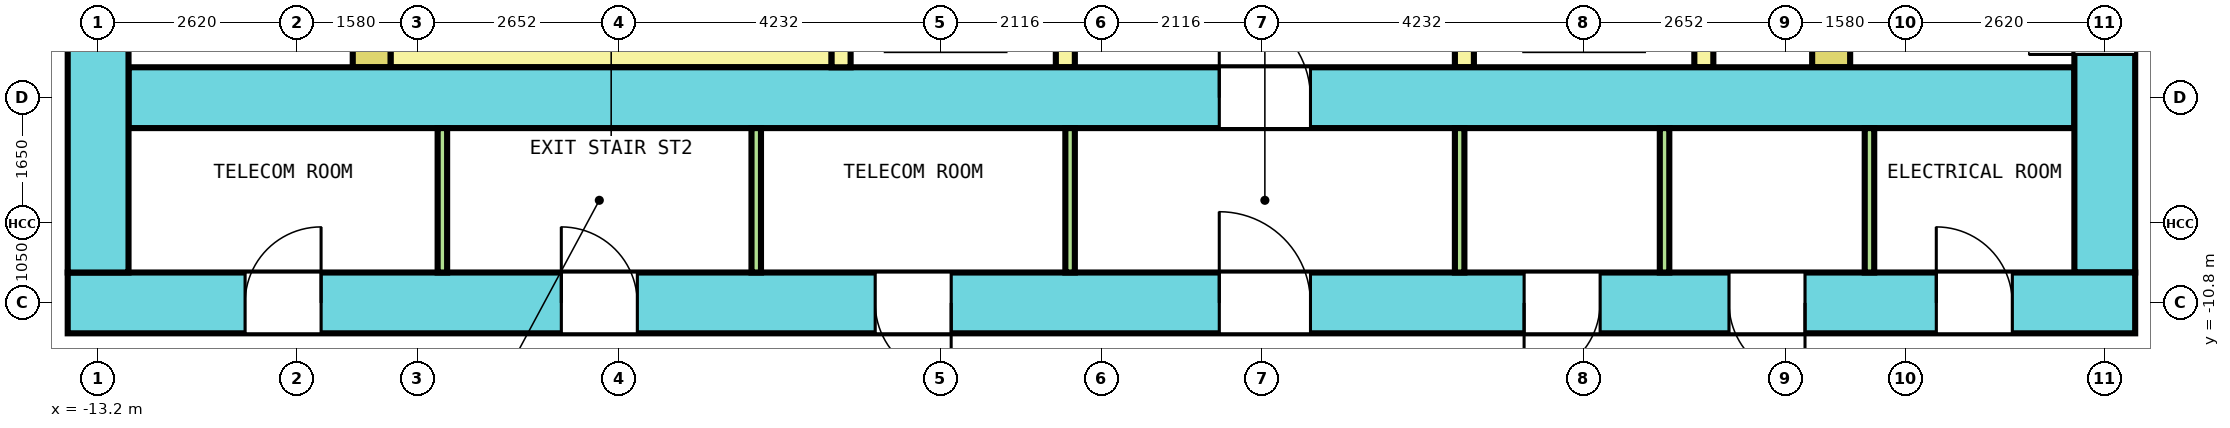
"""IFC4 building model, lengths in metres.
Left out: names, types, materials, properties, quantities, classifications, styles, units other than length and angle.
Written with IfcOpenShell. Run it as: python <this file> out.ifc"""

import sys

from ifc_helpers import new_model, si_unit, direction, frame, frame_2d, origin, place, context, subcontext, project, spatial, rectangle, extrude, element, fill, save


model = new_model("IFC4")
c1 = context("Model", 3, precision=1e-05, world=origin(), true_north=direction((0.0, 1.0)))
c2 = subcontext(c1, "Body", "Model", "MODEL_VIEW")
j1 = project(units=[si_unit("LENGTHUNIT", "METRE"), si_unit("PLANEANGLEUNIT", "RADIAN")], contexts=[c1])
p1 = place(None, origin())
s1 = spatial("IfcSite", under=j1, at=p1, CompositionType="ELEMENT")
p2 = place(p1, origin())
s2 = spatial("IfcBuilding", under=s1, at=p2, CompositionType="ELEMENT")
p3 = place(p2, frame((0.0, 0.0, 80.8)))
s3 = spatial("IfcBuildingStorey", under=s2, at=p3, CompositionType="ELEMENT", Elevation=80.8)
p4 = place(p3, frame((-13.6, -10.8, 0.0), z_axis=(0.0, 0.0, 1.0), x_axis=(1.0, 0.0, 0.0)))
e1 = element("IfcWall", 1, at=p4, inside=s3, PredefinedType="SHEAR", context=c2, shape_type="SweptSolid", body=[
    extrude(rectangle(XDim=27.2, YDim=0.8, at=frame_2d((13.6, 0.0))), origin(), (0.0, 0.0, 1.0), 4.1),
])
p5 = place(p4, frame((2.333, 0.0, 0.0)))
e2 = element("IfcOpeningElement", 2, at=p5, cuts=e1, PredefinedType="OPENING", context=c2, shape_type="SweptSolid", body=[
    extrude(rectangle(XDim=1.0, YDim=2.1, at=frame_2d((0.5, 1.05))), frame((0.0, 0.41, 0.0), z_axis=(0.0, -1.0, 0.0), x_axis=(1.0, 0.0, 0.0)), (0.0, 0.0, 1.0), 0.82),
])
p6 = place(p4, frame((6.494, 0.0, 0.0)))
e3 = element("IfcOpeningElement", 3, at=p6, cuts=e1, PredefinedType="OPENING", context=c2, shape_type="SweptSolid", body=[
    extrude(rectangle(XDim=1.0, YDim=2.1, at=frame_2d((0.5, 1.05))), frame((0.0, 0.41, 0.0), z_axis=(0.0, -1.0, 0.0), x_axis=(1.0, 0.0, 0.0)), (0.0, 0.0, 1.0), 0.82),
])
p7 = place(p4, frame((10.623, 0.0, 0.0)))
e4 = element("IfcOpeningElement", 4, at=p7, cuts=e1, PredefinedType="OPENING", context=c2, shape_type="SweptSolid", body=[
    extrude(rectangle(XDim=1.0, YDim=2.1, at=frame_2d((0.5, 1.05))), frame((0.0, 0.41, 0.0), z_axis=(0.0, -1.0, 0.0), x_axis=(1.0, 0.0, 0.0)), (0.0, 0.0, 1.0), 0.82),
])
p8 = place(p4, frame((19.16, 0.0, 0.0)))
e5 = element("IfcOpeningElement", 5, at=p8, cuts=e1, PredefinedType="OPENING", context=c2, shape_type="SweptSolid", body=[
    extrude(rectangle(XDim=1.0, YDim=2.1, at=frame_2d((0.5, 1.05))), frame((0.0, 0.41, 0.0), z_axis=(0.0, -1.0, 0.0), x_axis=(1.0, 0.0, 0.0)), (0.0, 0.0, 1.0), 0.82),
])
p9 = place(p4, frame((21.856, 0.0, 0.0)))
e6 = element("IfcOpeningElement", 6, at=p9, cuts=e1, PredefinedType="OPENING", context=c2, shape_type="SweptSolid", body=[
    extrude(rectangle(XDim=1.0, YDim=2.1, at=frame_2d((0.5, 1.05))), frame((0.0, 0.41, 0.0), z_axis=(0.0, -1.0, 0.0), x_axis=(1.0, 0.0, 0.0)), (0.0, 0.0, 1.0), 0.82),
])
p10 = place(p4, frame((24.583, 0.0, 0.0)))
e7 = element("IfcOpeningElement", 7, at=p10, cuts=e1, PredefinedType="OPENING", context=c2, shape_type="SweptSolid", body=[
    extrude(rectangle(XDim=1.0, YDim=2.1, at=frame_2d((0.5, 1.05))), frame((0.0, 0.41, 0.0), z_axis=(0.0, -1.0, 0.0), x_axis=(1.0, 0.0, 0.0)), (0.0, 0.0, 1.0), 0.82),
])
p11 = place(p4, frame((15.15, 0.0, 0.0)))
e8 = element("IfcOpeningElement", 8, at=p11, cuts=e1, PredefinedType="OPENING", context=c2, shape_type="SweptSolid", body=[
    extrude(rectangle(XDim=1.2, YDim=2.1, at=frame_2d((0.6, 1.05))), frame((0.0, 0.41, 0.0), z_axis=(0.0, -1.0, 0.0), x_axis=(1.0, 0.0, 0.0)), (0.0, 0.0, 1.0), 0.82),
])
p12 = place(p3, frame((-13.2, -10.4, 0.0), z_axis=(0.0, 0.0, 1.0), x_axis=(0.0, 1.0, 0.0)))
e9 = element("IfcWall", 9, at=p12, inside=s3, PredefinedType="SHEAR", context=c2, shape_type="SweptSolid", body=[
    extrude(rectangle(XDim=20.8, YDim=0.8, at=frame_2d((10.4, 0.0))), origin(), (0.0, 0.0, 1.0), 4.1),
])
p13 = place(p12, frame((9.2, 0.0, 0.0)))
e10 = element("IfcOpeningElement", 10, at=p13, cuts=e9, PredefinedType="OPENING", context=c2, shape_type="SweptSolid", body=[
    extrude(rectangle(XDim=2.4, YDim=2.1, at=frame_2d((1.2, 1.05))), frame((0.0, 0.41, 0.0), z_axis=(0.0, -1.0, 0.0), x_axis=(1.0, 0.0, 0.0)), (0.0, 0.0, 1.0), 0.82),
])
p14 = place(p12, frame((16.1, 0.0, 0.0)))
e11 = element("IfcOpeningElement", 11, at=p14, cuts=e9, PredefinedType="OPENING", context=c2, shape_type="SweptSolid", body=[
    extrude(rectangle(XDim=1.2, YDim=2.1, at=frame_2d((0.6, 1.05))), frame((0.0, 0.41, 0.0), z_axis=(0.0, -1.0, 0.0), x_axis=(1.0, 0.0, 0.0)), (0.0, 0.0, 1.0), 0.82),
])
p15 = place(p12, frame((3.5, 0.0, 0.0)))
e12 = element("IfcOpeningElement", 12, at=p15, cuts=e9, PredefinedType="OPENING", context=c2, shape_type="SweptSolid", body=[
    extrude(rectangle(XDim=1.2, YDim=2.1, at=frame_2d((0.6, 1.05))), frame((0.0, 0.41, 0.0), z_axis=(0.0, -1.0, 0.0), x_axis=(1.0, 0.0, 0.0)), (0.0, 0.0, 1.0), 0.82),
])
p16 = place(p3, frame((13.2, -10.4, 0.0), z_axis=(0.0, 0.0, 1.0), x_axis=(0.0, 1.0, 0.0)))
e13 = element("IfcWall", 13, at=p16, inside=s3, PredefinedType="SHEAR", context=c2, shape_type="SweptSolid", body=[
    extrude(rectangle(XDim=20.8, YDim=0.8, at=frame_2d((10.4, 0.0))), origin(), (0.0, 0.0, 1.0), 4.1),
])
p17 = place(p16, frame((9.2, 0.0, 0.0)))
e14 = element("IfcOpeningElement", 14, at=p17, cuts=e13, PredefinedType="OPENING", context=c2, shape_type="SweptSolid", body=[
    extrude(rectangle(XDim=2.4, YDim=2.1, at=frame_2d((1.2, 1.05))), frame((0.0, 0.41, 0.0), z_axis=(0.0, -1.0, 0.0), x_axis=(1.0, 0.0, 0.0)), (0.0, 0.0, 1.0), 0.82),
])
p18 = place(p16, frame((16.1, 0.0, 0.0)))
e15 = element("IfcOpeningElement", 15, at=p18, cuts=e13, PredefinedType="OPENING", context=c2, shape_type="SweptSolid", body=[
    extrude(rectangle(XDim=1.2, YDim=2.1, at=frame_2d((0.6, 1.05))), frame((0.0, 0.41, 0.0), z_axis=(0.0, -1.0, 0.0), x_axis=(1.0, 0.0, 0.0)), (0.0, 0.0, 1.0), 0.82),
])
p19 = place(p16, frame((2.869, 0.0, 0.0)))
e16 = element("IfcOpeningElement", 16, at=p19, cuts=e13, PredefinedType="OPENING", context=c2, shape_type="SweptSolid", body=[
    extrude(rectangle(XDim=1.0, YDim=2.1, at=frame_2d((0.5, 1.05))), frame((0.0, 0.41, 0.0), z_axis=(0.0, -1.0, 0.0), x_axis=(1.0, 0.0, 0.0)), (0.0, 0.0, 1.0), 0.82),
])
p20 = place(p16, frame((4.331, 0.0, 0.0)))
e17 = element("IfcOpeningElement", 17, at=p20, cuts=e13, PredefinedType="OPENING", context=c2, shape_type="SweptSolid", body=[
    extrude(rectangle(XDim=1.0, YDim=2.1, at=frame_2d((0.5, 1.05))), frame((0.0, 0.41, 0.0), z_axis=(0.0, -1.0, 0.0), x_axis=(1.0, 0.0, 0.0)), (0.0, 0.0, 1.0), 0.82),
])
p21 = place(p3, frame((-12.8, -8.1, 0.0), z_axis=(0.0, 0.0, 1.0), x_axis=(1.0, 0.0, 0.0)))
e18 = element("IfcWall", 18, at=p21, inside=s3, PredefinedType="SHEAR", context=c2, shape_type="SweptSolid", body=[
    extrude(rectangle(XDim=25.6, YDim=0.8, at=frame_2d((12.8, 0.0))), origin(), (0.0, 0.0, 1.0), 4.1),
])
p22 = place(p21, frame((14.35, 0.0, 0.0)))
e19 = element("IfcOpeningElement", 19, at=p22, cuts=e18, PredefinedType="OPENING", context=c2, shape_type="SweptSolid", body=[
    extrude(rectangle(XDim=1.2, YDim=2.1, at=frame_2d((0.6, 1.05))), frame((0.0, 0.41, 0.0), z_axis=(0.0, -1.0, 0.0), x_axis=(1.0, 0.0, 0.0)), (0.0, 0.0, 1.0), 0.82),
])
p23 = place(p3, frame((-9.6, -7.7, 0.0), z_axis=(0.0, 0.0, 1.0), x_axis=(0.0, 1.0, 0.0)))
e20 = element("IfcWall", 20, at=p23, inside=s3, PredefinedType="SHEAR", context=c2, shape_type="SweptSolid", body=[
    extrude(rectangle(XDim=15.4, YDim=0.5, at=frame_2d((7.7, 0.0))), origin(), (0.0, 0.0, 1.0), 4.1),
])
p24 = place(p23, frame((6.5, 0.0, 0.0)))
e21 = element("IfcOpeningElement", 21, at=p24, cuts=e20, PredefinedType="OPENING", context=c2, shape_type="SweptSolid", body=[
    extrude(rectangle(XDim=2.4, YDim=2.1, at=frame_2d((1.2, 1.05))), frame((0.0, 0.26, 0.0), z_axis=(0.0, -1.0, 0.0), x_axis=(1.0, 0.0, 0.0)), (0.0, 0.0, 1.0), 0.52),
])
p25 = place(p23, frame((13.4, 0.0, 0.0)))
e22 = element("IfcOpeningElement", 22, at=p25, cuts=e20, PredefinedType="OPENING", context=c2, shape_type="SweptSolid", body=[
    extrude(rectangle(XDim=1.2, YDim=2.1, at=frame_2d((0.6, 1.05))), frame((0.0, 0.26, 0.0), z_axis=(0.0, -1.0, 0.0), x_axis=(1.0, 0.0, 0.0)), (0.0, 0.0, 1.0), 0.52),
])
p26 = place(p23, frame((0.8, 0.0, 0.0)))
e23 = element("IfcOpeningElement", 23, at=p26, cuts=e20, PredefinedType="OPENING", context=c2, shape_type="SweptSolid", body=[
    extrude(rectangle(XDim=1.2, YDim=2.1, at=frame_2d((0.6, 1.05))), frame((0.0, 0.26, 0.0), z_axis=(0.0, -1.0, 0.0), x_axis=(1.0, 0.0, 0.0)), (0.0, 0.0, 1.0), 0.52),
])
p27 = place(p3, frame((9.6, -7.7, 0.0), z_axis=(0.0, 0.0, 1.0), x_axis=(0.0, 1.0, 0.0)))
e24 = element("IfcWall", 24, at=p27, inside=s3, PredefinedType="SHEAR", context=c2, shape_type="SweptSolid", body=[
    extrude(rectangle(XDim=15.4, YDim=0.5, at=frame_2d((7.7, 0.0))), origin(), (0.0, 0.0, 1.0), 4.1),
])
p28 = place(p27, frame((6.5, 0.0, 0.0)))
e25 = element("IfcOpeningElement", 25, at=p28, cuts=e24, PredefinedType="OPENING", context=c2, shape_type="SweptSolid", body=[
    extrude(rectangle(XDim=2.4, YDim=2.1, at=frame_2d((1.2, 1.05))), frame((0.0, 0.26, 0.0), z_axis=(0.0, -1.0, 0.0), x_axis=(1.0, 0.0, 0.0)), (0.0, 0.0, 1.0), 0.52),
])
p29 = place(p27, frame((13.4, 0.0, 0.0)))
e26 = element("IfcOpeningElement", 26, at=p29, cuts=e24, PredefinedType="OPENING", context=c2, shape_type="SweptSolid", body=[
    extrude(rectangle(XDim=1.2, YDim=2.1, at=frame_2d((0.6, 1.05))), frame((0.0, 0.26, 0.0), z_axis=(0.0, -1.0, 0.0), x_axis=(1.0, 0.0, 0.0)), (0.0, 0.0, 1.0), 0.52),
])
p30 = place(p27, frame((0.9, 0.0, 0.0)))
e27 = element("IfcOpeningElement", 27, at=p30, cuts=e24, PredefinedType="OPENING", context=c2, shape_type="SweptSolid", body=[
    extrude(rectangle(XDim=1.0, YDim=2.1, at=frame_2d((0.5, 1.05))), frame((0.0, 0.26, 0.0), z_axis=(0.0, -1.0, 0.0), x_axis=(1.0, 0.0, 0.0)), (0.0, 0.0, 1.0), 0.52),
])
p31 = place(p3, frame((-9.35, -7.575, 0.0), z_axis=(0.0, 0.0, 1.0), x_axis=(1.0, 0.0, 0.0)))
e28 = element("IfcWall", 28, at=p31, inside=s3, PredefinedType="SOLIDWALL", context=c2, shape_type="SweptSolid", body=[
    extrude(rectangle(XDim=5.8, YDim=0.25, at=frame_2d((2.9, 0.0))), origin(), (0.0, 0.0, 1.0), 4.1),
])
p32 = place(p3, frame((-3.425, -7.7, 0.0), z_axis=(0.0, 0.0, 1.0), x_axis=(0.0, 1.0, 0.0)))
e29 = element("IfcWall", 29, at=p32, inside=s3, PredefinedType="SOLIDWALL", context=c2, shape_type="SweptSolid", body=[
    extrude(rectangle(XDim=2.8, YDim=0.25, at=frame_2d((1.4, 0.0))), origin(), (0.0, 0.0, 1.0), 4.1),
])
p33 = place(p3, frame((-0.475, -7.7, 0.0), z_axis=(0.0, 0.0, 1.0), x_axis=(0.0, 1.0, 0.0)))
e30 = element("IfcWall", 30, at=p33, inside=s3, PredefinedType="SOLIDWALL", context=c2, shape_type="SweptSolid", body=[
    extrude(rectangle(XDim=2.8, YDim=0.25, at=frame_2d((1.4, 0.0))), origin(), (0.0, 0.0, 1.0), 4.1),
])
p34 = place(p33, frame((0.85, 0.0, 0.0)))
e31 = element("IfcOpeningElement", 31, at=p34, cuts=e30, PredefinedType="OPENING", context=c2, shape_type="SweptSolid", body=[
    extrude(rectangle(XDim=1.1, YDim=2.1, at=frame_2d((0.55, 1.05))), frame((0.0, 0.135, 0.0), z_axis=(0.0, -1.0, 0.0), x_axis=(1.0, 0.0, 0.0)), (0.0, 0.0, 1.0), 0.27),
])
p35 = place(p3, frame((4.775, -7.7, 0.0), z_axis=(0.0, 0.0, 1.0), x_axis=(0.0, 1.0, 0.0)))
e32 = element("IfcWall", 32, at=p35, inside=s3, PredefinedType="SOLIDWALL", context=c2, shape_type="SweptSolid", body=[
    extrude(rectangle(XDim=2.8, YDim=0.25, at=frame_2d((1.4, 0.0))), origin(), (0.0, 0.0, 1.0), 4.1),
])
p36 = place(p35, frame((0.85, 0.0, 0.0)))
e33 = element("IfcOpeningElement", 33, at=p36, cuts=e32, PredefinedType="OPENING", context=c2, shape_type="SweptSolid", body=[
    extrude(rectangle(XDim=1.1, YDim=2.1, at=frame_2d((0.55, 1.05))), frame((0.0, 0.135, 0.0), z_axis=(0.0, -1.0, 0.0), x_axis=(1.0, 0.0, 0.0)), (0.0, 0.0, 1.0), 0.27),
])
p37 = place(p3, frame((7.925, -7.7, 0.0), z_axis=(0.0, 0.0, 1.0), x_axis=(0.0, 1.0, 0.0)))
e34 = element("IfcWall", 34, at=p37, inside=s3, PredefinedType="SOLIDWALL", context=c2, shape_type="SweptSolid", body=[
    extrude(rectangle(XDim=2.8, YDim=0.25, at=frame_2d((1.4, 0.0))), origin(), (0.0, 0.0, 1.0), 4.1),
])
for number, where, z_axis, x_axis in (
    (35, (-8.671, -10.4, 0.0), (0.0, 0.0, 1.0), (0.0, 1.0, 0.0)),
    (36, (-4.542, -10.4, 0.0), (0.0, 0.0, 1.0), (0.0, 1.0, 0.0)),
    (37, (-0.413, -10.4, 0.0), (0.0, 0.0, 1.0), (0.0, 1.0, 0.0)),
    (38, (4.712, -10.4, 0.0), (0.0, 0.0, 1.0), (0.0, 1.0, 0.0)),
    (39, (7.408, -10.4, 0.0), (0.0, 0.0, 1.0), (0.0, 1.0, 0.0)),
    (40, (10.104, -10.4, 0.0), (0.0, 0.0, 1.0), (0.0, 1.0, 0.0)),
):
    element("IfcWall", number, at=place(p3, frame(where, z_axis=z_axis, x_axis=x_axis)), inside=s3, PredefinedType="PARTITIONING", context=c2, shape_type="SweptSolid", body=[
        extrude(rectangle(XDim=1.9, YDim=0.125, at=frame_2d((0.95, 0.0))), origin(), (0.0, 0.0, 1.0), 4.1),
    ])
p38 = place(p22, origin())
e41 = element("IfcDoor", 41, at=p38, inside=s3, OperationType="SINGLE_SWING_LEFT", PredefinedType="DOOR", context=c2, shape_type="SweptSolid", body=[
    extrude(rectangle(XDim=1.2, YDim=2.1, at=frame_2d((0.6, 1.05))), frame((0.0, 0.3, 0.0), z_axis=(0.0, -1.0, 0.0), x_axis=(1.0, 0.0, 0.0)), (0.0, 0.0, 1.0), 0.6),
])
fill(e19, e41)
p39 = place(p19, origin())
e42 = element("IfcDoor", 42, at=p39, inside=s3, OperationType="SINGLE_SWING_RIGHT", PredefinedType="DOOR", context=c2, shape_type="SweptSolid", body=[
    extrude(rectangle(XDim=1.0, YDim=2.1, at=frame_2d((0.5, 1.05))), frame((0.0, 0.3, 0.0), z_axis=(0.0, -1.0, 0.0), x_axis=(1.0, 0.0, 0.0)), (0.0, 0.0, 1.0), 0.6),
])
fill(e16, e42)
p40 = place(p5, origin())
e43 = element("IfcDoor", 43, at=p40, inside=s3, OperationType="SINGLE_SWING_RIGHT", PredefinedType="DOOR", context=c2, shape_type="SweptSolid", body=[
    extrude(rectangle(XDim=1.0, YDim=2.1, at=frame_2d((0.5, 1.05))), frame((0.0, 0.3, 0.0), z_axis=(0.0, -1.0, 0.0), x_axis=(1.0, 0.0, 0.0)), (0.0, 0.0, 1.0), 0.6),
])
fill(e2, e43)
p41 = place(p6, origin())
e44 = element("IfcDoor", 44, at=p41, inside=s3, OperationType="SINGLE_SWING_LEFT", PredefinedType="DOOR", context=c2, shape_type="SweptSolid", body=[
    extrude(rectangle(XDim=1.0, YDim=2.1, at=frame_2d((0.5, 1.05))), frame((0.0, 0.3, 0.0), z_axis=(0.0, -1.0, 0.0), x_axis=(1.0, 0.0, 0.0)), (0.0, 0.0, 1.0), 0.6),
])
fill(e3, e44)
p42 = place(p7, origin())
e45 = element("IfcDoor", 45, at=p42, inside=s3, OperationType="SINGLE_SWING_RIGHT", PredefinedType="DOOR", context=c2, shape_type="SweptSolid", body=[
    extrude(rectangle(XDim=1.0, YDim=2.1, at=frame_2d((0.5, 1.05))), frame((0.0, 0.3, 0.0), z_axis=(0.0, -1.0, 0.0), x_axis=(1.0, 0.0, 0.0)), (0.0, 0.0, 1.0), 0.6),
])
fill(e4, e45)
p43 = place(p8, origin())
e46 = element("IfcDoor", 46, at=p43, inside=s3, OperationType="SINGLE_SWING_LEFT", PredefinedType="DOOR", context=c2, shape_type="SweptSolid", body=[
    extrude(rectangle(XDim=1.0, YDim=2.1, at=frame_2d((0.5, 1.05))), frame((0.0, 0.3, 0.0), z_axis=(0.0, -1.0, 0.0), x_axis=(1.0, 0.0, 0.0)), (0.0, 0.0, 1.0), 0.6),
])
fill(e5, e46)
p44 = place(p9, origin())
e47 = element("IfcDoor", 47, at=p44, inside=s3, OperationType="SINGLE_SWING_RIGHT", PredefinedType="DOOR", context=c2, shape_type="SweptSolid", body=[
    extrude(rectangle(XDim=1.0, YDim=2.1, at=frame_2d((0.5, 1.05))), frame((0.0, 0.3, 0.0), z_axis=(0.0, -1.0, 0.0), x_axis=(1.0, 0.0, 0.0)), (0.0, 0.0, 1.0), 0.6),
])
fill(e6, e47)
p45 = place(p10, origin())
e48 = element("IfcDoor", 48, at=p45, inside=s3, OperationType="SINGLE_SWING_LEFT", PredefinedType="DOOR", context=c2, shape_type="SweptSolid", body=[
    extrude(rectangle(XDim=1.0, YDim=2.1, at=frame_2d((0.5, 1.05))), frame((0.0, 0.3, 0.0), z_axis=(0.0, -1.0, 0.0), x_axis=(1.0, 0.0, 0.0)), (0.0, 0.0, 1.0), 0.6),
])
fill(e7, e48)
p46 = place(p11, origin())
e49 = element("IfcDoor", 49, at=p46, inside=s3, OperationType="SINGLE_SWING_RIGHT", PredefinedType="DOOR", context=c2, shape_type="SweptSolid", body=[
    extrude(rectangle(XDim=1.2, YDim=2.1, at=frame_2d((0.6, 1.05))), frame((0.0, 0.3, 0.0), z_axis=(0.0, -1.0, 0.0), x_axis=(1.0, 0.0, 0.0)), (0.0, 0.0, 1.0), 0.6),
])
fill(e8, e49)
save(model, sys.argv[1])
